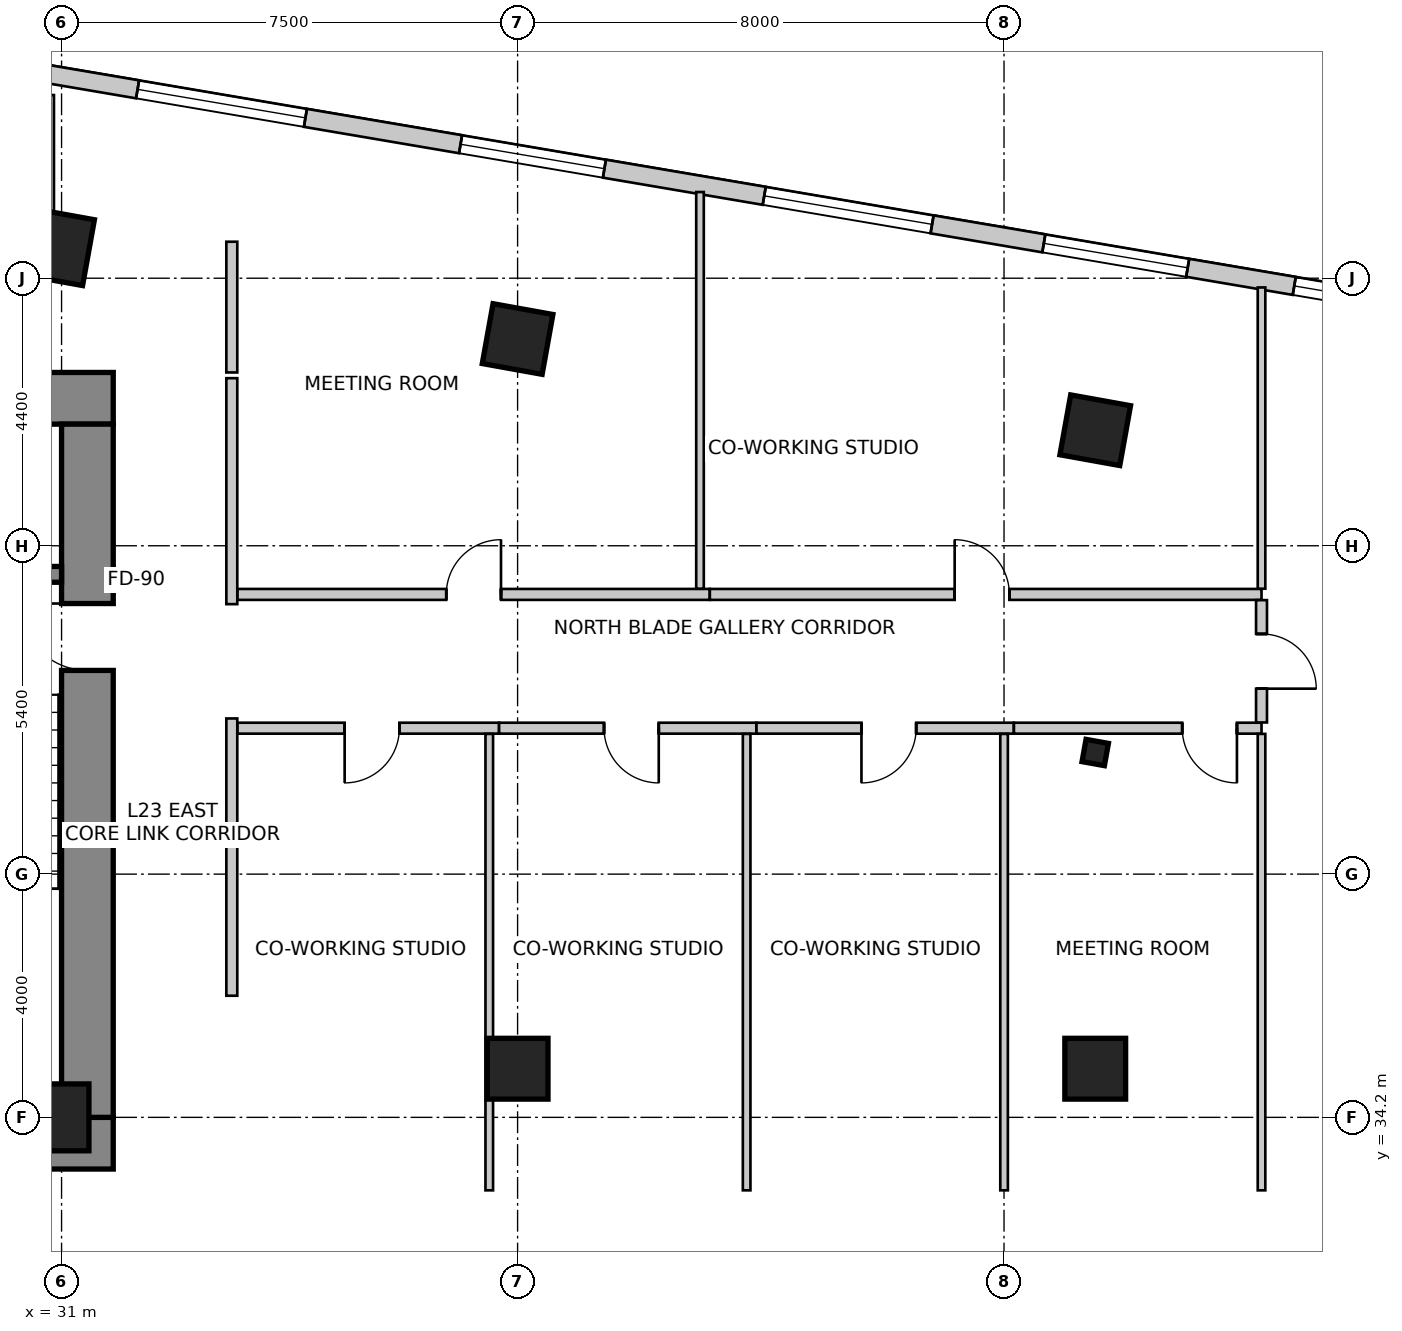
"""IFC4 building model, lengths in metres.
Left out: names, types, materials, properties, quantities, classifications, styles, units other than length and angle.
Written with IfcOpenShell. Run it as: python <this file> out.ifc"""

import sys

from ifc_helpers import new_model, si_unit, direction, frame, frame_2d, origin, origin_2d, place, context, subcontext, project, spatial, rectangle, i_section, extrude, source, transform, mapped, element, fill, save


model = new_model("IFC4")
c1 = context("Model", 3, precision=1e-05, world=origin(), true_north=direction((0.0, 1.0)))
c2 = subcontext(c1, "Body", "Model", "MODEL_VIEW")
j1 = project(units=[si_unit("LENGTHUNIT", "METRE"), si_unit("PLANEANGLEUNIT", "RADIAN")], contexts=[c1])
p1 = place(None, origin())
s1 = spatial("IfcSite", under=j1, at=p1, CompositionType="ELEMENT")
p2 = place(p1, origin())
s2 = spatial("IfcBuilding", under=s1, at=p2, CompositionType="ELEMENT")
p3 = place(p2, frame((0.0, 0.0, 95.0)))
s3 = spatial("IfcBuildingStorey", under=s2, at=p3, CompositionType="ELEMENT", Elevation=95.0)
p4 = place(p3, frame((15.75, 46.025, 0.0), z_axis=(0.0, 0.0, 1.0), x_axis=(1.0, 0.0, 0.0)))
e1 = element("IfcWall", 1, at=p4, inside=s3, PredefinedType="SHEAR", context=c2, shape_type="SweptSolid", body=[
    extrude(rectangle(XDim=16.1, YDim=0.85, at=frame_2d((8.05, 0.0))), origin(), (0.0, 0.0, 1.0), 4.0),
])
p5 = place(p3, frame((15.75, 33.775, 0.0), z_axis=(0.0, 0.0, 1.0), x_axis=(1.0, 0.0, 0.0)))
e2 = element("IfcWall", 2, at=p5, inside=s3, PredefinedType="SHEAR", context=c2, shape_type="SweptSolid", body=[
    extrude(rectangle(XDim=16.1, YDim=0.85, at=frame_2d((8.05, 0.0))), origin(), (0.0, 0.0, 1.0), 4.0),
])
m1 = source(origin(), c2, "Body", "SweptSolid", [
    extrude(rectangle(XDim=1.3, YDim=2.15, at=frame_2d((0.65, 1.075))), frame((0.0, 0.435, 0.0), z_axis=(0.0, -1.0, 0.0), x_axis=(1.0, 0.0, 0.0)), (0.0, 0.0, 1.0), 0.87),
])
p6 = place(p5, frame((10.18, 0.0, 0.0)))
e3 = element("IfcOpeningElement", 3, at=p6, cuts=e2, PredefinedType="OPENING", context=c2, shape_type="MappedRepresentation", body=[
    mapped(m1, transform((0.0, 0.0, 0.0), scale=1.0)),
])
p7 = place(p3, frame((31.425, 34.2, 0.0), z_axis=(0.0, 0.0, 1.0), x_axis=(0.0, 1.0, 0.0)))
e4 = element("IfcWall", 4, at=p7, inside=s3, PredefinedType="SHEAR", context=c2, shape_type="SweptSolid", body=[
    extrude(rectangle(XDim=11.4, YDim=0.85, at=frame_2d((5.7, 0.0))), origin(), (0.0, 0.0, 1.0), 4.0),
])
m2 = source(origin(), c2, "Body", "SweptSolid", [
    extrude(rectangle(XDim=1.1, YDim=2.15, at=frame_2d((0.55, 1.075))), frame((0.0, 0.435, 0.0), z_axis=(0.0, -1.0, 0.0), x_axis=(1.0, 0.0, 0.0)), (0.0, 0.0, 1.0), 0.87),
])
p8 = place(p7, frame((7.35, 0.0, 0.0)))
e5 = element("IfcOpeningElement", 5, at=p8, cuts=e4, PredefinedType="OPENING", context=c2, shape_type="MappedRepresentation", body=[
    mapped(m2, transform((0.0, 0.0, 0.0), scale=1.0)),
])
p9 = place(p3, frame((27.5, 43.13, 0.0), z_axis=(0.0, 0.0, 1.0), x_axis=(1.0, 0.0, 0.0)))
e6 = element("IfcWall", 6, at=p9, inside=s3, PredefinedType="SHEAR", context=c2, shape_type="SweptSolid", body=[
    extrude(rectangle(XDim=3.5, YDim=0.26, at=frame_2d((1.75, 0.0))), origin(), (0.0, 0.0, 1.0), 4.0),
])
m3 = source(origin(), c2, "Body", "SweptSolid", [
    extrude(rectangle(XDim=0.9, YDim=1.1, at=origin_2d()), origin(), (0.0, 0.0, 1.0), 4.0),
])
p10 = place(p3, frame((31.0, 48.5, 0.0), z_axis=(0.0, 0.0, 1.0), x_axis=(0.984195607969, -0.17708474032, 0.0)))
e7 = element("IfcColumn", 7, at=p10, inside=s3, PredefinedType="COLUMN", context=c2, shape_type="MappedRepresentation", body=[
    mapped(m3, transform((0.0, 0.0, 0.0), scale=1.0)),
])
m4 = source(origin(), c2, "Body", "SweptSolid", [
    extrude(rectangle(XDim=1.0, YDim=1.0, at=origin_2d()), origin(), (0.0, 0.0, 1.0), 4.0),
])
for number, where, z_axis, x_axis in (
    (8, (38.5, 47.0, 0.0), (0.0, 0.0, 1.0), (0.984, -0.177, 0.0)),
    (9, (48.0, 45.5, 0.0), (0.0, 0.0, 1.0), (0.984, -0.177, 0.0)),
):
    element("IfcColumn", number, at=place(p3, frame(where, z_axis=z_axis, x_axis=x_axis)), inside=s3, PredefinedType="COLUMN", context=c2, shape_type="MappedRepresentation", body=[
        mapped(m4, transform((0.0, 0.0, 0.0), scale=1.0)),
    ])
p11 = place(p3, frame((31.0, 34.2, 0.0), z_axis=(0.0, 0.0, 1.0), x_axis=(1.0, 0.0, 0.0)))
e10 = element("IfcColumn", 10, at=p11, inside=s3, PredefinedType="COLUMN", context=c2, shape_type="MappedRepresentation", body=[
    mapped(m3, transform((0.0, 0.0, 0.0), scale=1.0)),
])
for number, where, z_axis, x_axis in (
    (11, (38.5, 35.0, 0.0), (0.0, 0.0, 1.0), (1.0, 0.0, 0.0)),
    (12, (48.0, 35.0, 0.0), (0.0, 0.0, 1.0), (1.0, 0.0, 0.0)),
):
    element("IfcColumn", number, at=place(p3, frame(where, z_axis=z_axis, x_axis=x_axis)), inside=s3, PredefinedType="COLUMN", context=c2, shape_type="MappedRepresentation", body=[
        mapped(m4, transform((0.0, 0.0, 0.0), scale=1.0)),
    ])
m5 = source(origin(), c2, "Body", "SweptSolid", [
    extrude(i_section(OverallWidth=0.374, OverallDepth=0.372, WebThickness=0.016, FlangeThickness=0.026, FilletRadius=0.015, at=origin_2d()), origin(), (0.0, 0.0, 1.0), 4.0),
])
p12 = place(p3, frame((48.0, 40.2, 0.0), z_axis=(0.0, 0.0, 1.0), x_axis=(0.984195607969, -0.17708474032, 0.0)))
e13 = element("IfcColumn", 13, at=p12, inside=s3, PredefinedType="COLUMN", context=c2, shape_type="MappedRepresentation", body=[
    mapped(m5, transform((0.0, 0.0, 0.0), scale=1.0)),
])
p13 = place(p3, frame((53.961, 47.417, 0.0), z_axis=(0.0, 0.0, 1.0), x_axis=(-0.985865713455, 0.167537443678, 0.0)))
e14 = element("IfcWall", 14, at=p13, inside=s3, PredefinedType="SOLIDWALL", context=c2, shape_type="SweptSolid", body=[
    extrude(rectangle(XDim=32.537, YDim=0.3, at=frame_2d((16.269, 0.0))), origin(), (0.0, 0.0, 1.0), 3.7),
])
m6 = source(origin(), c2, "Body", "SweptSolid", [
    extrude(rectangle(XDim=2.1, YDim=2.0, at=frame_2d((1.05, 1.0))), frame((0.0, 0.16, 0.0), z_axis=(0.0, -1.0, 0.0), x_axis=(1.0, 0.0, 0.0)), (0.0, 0.0, 1.0), 0.32),
])
p14 = place(p13, frame((0.626, 0.0, 0.85)))
e15 = element("IfcOpeningElement", 15, at=p14, cuts=e14, PredefinedType="OPENING", context=c2, shape_type="MappedRepresentation", body=[
    mapped(m6, transform((0.0, 0.0, 0.0), scale=1.0)),
])
m7 = source(origin(), c2, "Body", "SweptSolid", [
    extrude(rectangle(XDim=2.4, YDim=2.2, at=frame_2d((1.2, 1.1))), frame((0.0, 0.16, 0.0), z_axis=(0.0, -1.0, 0.0), x_axis=(1.0, 0.0, 0.0)), (0.0, 0.0, 1.0), 0.32),
])
p15 = place(p13, frame((4.504, 0.0, 0.85)))
e16 = element("IfcOpeningElement", 16, at=p15, cuts=e14, PredefinedType="OPENING", context=c2, shape_type="MappedRepresentation", body=[
    mapped(m7, transform((0.0, 0.0, 0.0), scale=1.0)),
])
m8 = source(origin(), c2, "Body", "SweptSolid", [
    extrude(rectangle(XDim=2.8, YDim=2.4, at=frame_2d((1.4, 1.2))), frame((0.0, 0.16, 0.0), z_axis=(0.0, -1.0, 0.0), x_axis=(1.0, 0.0, 0.0)), (0.0, 0.0, 1.0), 0.32),
])
p16 = place(p13, frame((8.768, 0.0, 0.85)))
e17 = element("IfcOpeningElement", 17, at=p16, cuts=e14, PredefinedType="OPENING", context=c2, shape_type="MappedRepresentation", body=[
    mapped(m8, transform((0.0, 0.0, 0.0), scale=1.0)),
])
p17 = place(p13, frame((14.234, 0.0, 0.85)))
e18 = element("IfcOpeningElement", 18, at=p17, cuts=e14, PredefinedType="OPENING", context=c2, shape_type="MappedRepresentation", body=[
    mapped(m7, transform((0.0, 0.0, 0.0), scale=1.0)),
])
p18 = place(p13, frame((19.222, 0.0, 0.85)))
e19 = element("IfcOpeningElement", 19, at=p18, cuts=e14, PredefinedType="OPENING", context=c2, shape_type="MappedRepresentation", body=[
    mapped(m8, transform((0.0, 0.0, 0.0), scale=1.0)),
])
p19 = place(p13, frame((25.095, 0.0, 0.85)))
e20 = element("IfcOpeningElement", 20, at=p19, cuts=e14, PredefinedType="OPENING", context=c2, shape_type="MappedRepresentation", body=[
    mapped(m7, transform((0.0, 0.0, 0.0), scale=1.0)),
])
p20 = place(p13, frame((29.595, 0.0, 0.85)))
e21 = element("IfcOpeningElement", 21, at=p20, cuts=e14, PredefinedType="OPENING", context=c2, shape_type="MappedRepresentation", body=[
    mapped(m7, transform((0.0, 0.0, 0.0), scale=1.0)),
])
p21 = place(p3, frame((25.362, 48.6, 0.0), z_axis=(0.0, 0.0, 1.0), x_axis=(1.0, 0.0, 0.0)))
e22 = element("IfcWall", 22, at=p21, inside=s3, PredefinedType="PARTITIONING", context=c2, shape_type="SweptSolid", body=[
    extrude(rectangle(XDim=5.598, YDim=0.18, at=frame_2d((2.799, 0.0))), origin(), (0.0, 0.0, 1.0), 2.842),
])
m9 = source(origin(), c2, "Body", "SweptSolid", [
    extrude(rectangle(XDim=0.9, YDim=2.15, at=frame_2d((0.45, 1.075))), frame((0.0, 0.1, 0.0), z_axis=(0.0, -1.0, 0.0), x_axis=(1.0, 0.0, 0.0)), (0.0, 0.0, 1.0), 0.2),
])
p22 = place(p21, frame((2.349, 0.0, 0.0)))
e23 = element("IfcOpeningElement", 23, at=p22, cuts=e22, PredefinedType="OPENING", context=c2, shape_type="MappedRepresentation", body=[
    mapped(m9, transform((0.0, 0.0, 0.0), scale=1.0)),
])
p23 = place(p3, frame((33.8, 48.6, 0.0), z_axis=(0.0, 0.0, 1.0), x_axis=(0.0, -1.0, 0.0)))
e24 = element("IfcWall", 24, at=p23, inside=s3, PredefinedType="PARTITIONING", context=c2, shape_type="SweptSolid", body=[
    extrude(rectangle(XDim=2.15, YDim=0.18, at=frame_2d((1.075, 0.0))), origin(), (0.0, 0.0, 1.0), 2.842),
])
p24 = place(p3, frame((33.8, 40.76, 0.0), z_axis=(0.0, 0.0, 1.0), x_axis=(0.0, -1.0, 0.0)))
e25 = element("IfcWall", 25, at=p24, inside=s3, PredefinedType="PARTITIONING", context=c2, shape_type="SweptSolid", body=[
    extrude(rectangle(XDim=4.56, YDim=0.18, at=frame_2d((2.28, 0.0))), origin(), (0.0, 0.0, 1.0), 3.7),
])
p25 = place(p3, frame((33.8, 46.356, 0.0), z_axis=(0.0, 0.0, 1.0), x_axis=(0.0, -1.0, 0.0)))
e26 = element("IfcWall", 26, at=p25, inside=s3, PredefinedType="PARTITIONING", context=c2, shape_type="SweptSolid", body=[
    extrude(rectangle(XDim=3.716, YDim=0.18, at=frame_2d((1.858, 0.0))), origin(), (0.0, 0.0, 1.0), 3.272),
])
p26 = place(p3, frame((38.194, 40.6, 0.0), z_axis=(0.0, 0.0, 1.0), x_axis=(-1.0, 0.0, 0.0)))
e27 = element("IfcWall", 27, at=p26, inside=s3, PredefinedType="PARTITIONING", context=c2, shape_type="SweptSolid", body=[
    extrude(rectangle(XDim=4.3, YDim=0.18, at=frame_2d((2.15, 0.0))), origin(), (0.0, 0.0, 1.0), 3.384),
])
p27 = place(p26, frame((1.638, 0.0, 0.0)))
e28 = element("IfcOpeningElement", 28, at=p27, cuts=e27, PredefinedType="OPENING", context=c2, shape_type="MappedRepresentation", body=[
    mapped(m9, transform((0.0, 0.0, 0.0), scale=1.0)),
])
p28 = place(p3, frame((42.427, 40.6, 0.0), z_axis=(0.0, 0.0, 1.0), x_axis=(-1.0, 0.0, 0.0)))
e29 = element("IfcWall", 29, at=p28, inside=s3, PredefinedType="PARTITIONING", context=c2, shape_type="SweptSolid", body=[
    extrude(rectangle(XDim=4.231, YDim=0.18, at=frame_2d((2.115, 0.0))), origin(), (0.0, 0.0, 1.0), 3.075),
])
p29 = place(p28, frame((1.605, 0.0, 0.0)))
e30 = element("IfcOpeningElement", 30, at=p29, cuts=e29, PredefinedType="OPENING", context=c2, shape_type="MappedRepresentation", body=[
    mapped(m9, transform((0.0, 0.0, 0.0), scale=1.0)),
])
p30 = place(p3, frame((46.661, 40.6, 0.0), z_axis=(0.0, 0.0, 1.0), x_axis=(-1.0, 0.0, 0.0)))
e31 = element("IfcWall", 31, at=p30, inside=s3, PredefinedType="PARTITIONING", context=c2, shape_type="SweptSolid", body=[
    extrude(rectangle(XDim=4.232, YDim=0.18, at=frame_2d((2.116, 0.0))), origin(), (0.0, 0.0, 1.0), 3.272),
])
p31 = place(p30, frame((1.606, 0.0, 0.0)))
e32 = element("IfcOpeningElement", 32, at=p31, cuts=e31, PredefinedType="OPENING", context=c2, shape_type="MappedRepresentation", body=[
    mapped(m9, transform((0.0, 0.0, 0.0), scale=1.0)),
])
p32 = place(p3, frame((50.735, 40.6, 0.0), z_axis=(0.0, 0.0, 1.0), x_axis=(-1.0, 0.0, 0.0)))
e33 = element("IfcWall", 33, at=p32, inside=s3, PredefinedType="PARTITIONING", context=c2, shape_type="SweptSolid", body=[
    extrude(rectangle(XDim=4.072, YDim=0.18, at=frame_2d((2.036, 0.0))), origin(), (0.0, 0.0, 1.0), 3.075),
])
p33 = place(p32, frame((0.404, 0.0, 0.0)))
e34 = element("IfcOpeningElement", 34, at=p33, cuts=e33, PredefinedType="OPENING", context=c2, shape_type="MappedRepresentation", body=[
    mapped(m9, transform((0.0, 0.0, 0.0), scale=1.0)),
])
p34 = place(p3, frame((33.894, 42.8, 0.0), z_axis=(0.0, 0.0, 1.0), x_axis=(1.0, 0.0, 0.0)))
e35 = element("IfcWall", 35, at=p34, inside=s3, PredefinedType="PARTITIONING", context=c2, shape_type="SweptSolid", body=[
    extrude(rectangle(XDim=7.766, YDim=0.18, at=frame_2d((3.883, 0.0))), origin(), (0.0, 0.0, 1.0), 3.075),
])
p35 = place(p34, frame((3.433, 0.0, 0.0)))
e36 = element("IfcOpeningElement", 36, at=p35, cuts=e35, PredefinedType="OPENING", context=c2, shape_type="MappedRepresentation", body=[
    mapped(m9, transform((0.0, 0.0, 0.0), scale=1.0)),
])
p36 = place(p3, frame((41.662, 42.8, 0.0), z_axis=(0.0, 0.0, 1.0), x_axis=(1.0, 0.0, 0.0)))
e37 = element("IfcWall", 37, at=p36, inside=s3, PredefinedType="PARTITIONING", context=c2, shape_type="SweptSolid", body=[
    extrude(rectangle(XDim=9.073, YDim=0.18, at=frame_2d((4.537, 0.0))), origin(), (0.0, 0.0, 1.0), 3.075),
])
p37 = place(p36, frame((4.026, 0.0, 0.0)))
e38 = element("IfcOpeningElement", 38, at=p37, cuts=e37, PredefinedType="OPENING", context=c2, shape_type="MappedRepresentation", body=[
    mapped(m9, transform((0.0, 0.0, 0.0), scale=1.0)),
])
p38 = place(p3, frame((50.735, 42.706, 0.0), z_axis=(0.0, 0.0, 1.0), x_axis=(0.0, -1.0, 0.0)))
e39 = element("IfcWall", 39, at=p38, inside=s3, PredefinedType="PARTITIONING", context=c2, shape_type="SweptSolid", body=[
    extrude(rectangle(XDim=2.012, YDim=0.18, at=frame_2d((1.006, 0.0))), origin(), (0.0, 0.0, 1.0), 3.7),
])
p39 = place(p38, frame((0.556, 0.0, 0.0)))
e40 = element("IfcOpeningElement", 40, at=p39, cuts=e39, PredefinedType="OPENING", context=c2, shape_type="MappedRepresentation", body=[
    mapped(m9, transform((0.0, 0.0, 0.0), scale=1.0)),
])
p40 = place(p3, frame((38.034, 40.506, 0.0), z_axis=(0.0, 0.0, 1.0), x_axis=(0.0, -1.0, 0.0)))
e41 = element("IfcWall", 41, at=p40, inside=s3, PredefinedType="PARTITIONING", context=c2, shape_type="SweptSolid", body=[
    extrude(rectangle(XDim=7.506, YDim=0.125, at=frame_2d((3.753, 0.0))), origin(), (0.0, 0.0, 1.0), 3.384),
])
for number, where, z_axis, x_axis in (
    (42, (42.267, 40.506, 0.0), (0.0, 0.0, 1.0), (0.0, -1.0, 0.0)),
    (43, (46.501, 40.506, 0.0), (0.0, 0.0, 1.0), (0.0, -1.0, 0.0)),
):
    element("IfcWall", number, at=place(p3, frame(where, z_axis=z_axis, x_axis=x_axis)), inside=s3, PredefinedType="PARTITIONING", context=c2, shape_type="SweptSolid", body=[
        extrude(rectangle(XDim=7.506, YDim=0.125, at=frame_2d((3.753, 0.0))), origin(), (0.0, 0.0, 1.0), 2.842),
    ])
p41 = place(p3, frame((50.735, 40.506, 0.0), z_axis=(0.0, 0.0, 1.0), x_axis=(0.0, -1.0, 0.0)))
e44 = element("IfcWall", 44, at=p41, inside=s3, PredefinedType="PARTITIONING", context=c2, shape_type="SweptSolid", body=[
    extrude(rectangle(XDim=7.506, YDim=0.125, at=frame_2d((3.753, 0.0))), origin(), (0.0, 0.0, 1.0), 3.7),
])
p42 = place(p3, frame((41.5, 49.417, 0.0), z_axis=(0.0, 0.0, 1.0), x_axis=(0.0, -1.0, 0.0)))
e45 = element("IfcWall", 45, at=p42, inside=s3, PredefinedType="PARTITIONING", context=c2, shape_type="SweptSolid", body=[
    extrude(rectangle(XDim=6.523, YDim=0.125, at=frame_2d((3.262, 0.0))), origin(), (0.0, 0.0, 1.0), 2.842),
])
p43 = place(p3, frame((50.735, 47.848, 0.0), z_axis=(0.0, 0.0, 1.0), x_axis=(0.0, -1.0, 0.0)))
e46 = element("IfcWall", 46, at=p43, inside=s3, PredefinedType="PARTITIONING", context=c2, shape_type="SweptSolid", body=[
    extrude(rectangle(XDim=4.954, YDim=0.125, at=frame_2d((2.477, 0.0))), origin(), (0.0, 0.0, 1.0), 3.7),
])
p44 = place(p3, frame((30.8, 51.013, 0.0), z_axis=(0.0, 0.0, 1.0), x_axis=(0.0, -1.0, 0.0)))
e47 = element("IfcWall", 47, at=p44, inside=s3, PredefinedType="PARTITIONING", context=c2, shape_type="SweptSolid", body=[
    extrude(rectangle(XDim=2.193, YDim=0.15, at=frame_2d((1.096, 0.0))), origin(), (0.0, 0.0, 1.0), 3.7),
])
m10 = source(origin(), c2, "Body", "SweptSolid", [
    extrude(rectangle(XDim=2.1, YDim=2.0, at=frame_2d((1.05, 1.0))), frame((0.0, -0.015, 0.0), z_axis=(0.0, -1.0, 0.0), x_axis=(1.0, 0.0, 0.0)), (0.0, 0.0, 1.0), 0.06),
])
p45 = place(p14, origin())
e48 = element("IfcWindow", 48, at=p45, inside=s3, PartitioningType="SINGLE_PANEL", PredefinedType="WINDOW", context=c2, shape_type="MappedRepresentation", body=[
    mapped(m10, transform((0.0, 0.0, 0.0), scale=1.0)),
])
fill(e15, e48)
m11 = source(origin(), c2, "Body", "SweptSolid", [
    extrude(rectangle(XDim=2.4, YDim=2.2, at=frame_2d((1.2, 1.1))), frame((0.0, -0.015, 0.0), z_axis=(0.0, -1.0, 0.0), x_axis=(1.0, 0.0, 0.0)), (0.0, 0.0, 1.0), 0.06),
])
p46 = place(p15, origin())
e49 = element("IfcWindow", 49, at=p46, inside=s3, PartitioningType="SINGLE_PANEL", PredefinedType="WINDOW", context=c2, shape_type="MappedRepresentation", body=[
    mapped(m11, transform((0.0, 0.0, 0.0), scale=1.0)),
])
fill(e16, e49)
m12 = source(origin(), c2, "Body", "SweptSolid", [
    extrude(rectangle(XDim=2.8, YDim=2.4, at=frame_2d((1.4, 1.2))), frame((0.0, -0.015, 0.0), z_axis=(0.0, -1.0, 0.0), x_axis=(1.0, 0.0, 0.0)), (0.0, 0.0, 1.0), 0.06),
])
p47 = place(p16, origin())
e50 = element("IfcWindow", 50, at=p47, inside=s3, PartitioningType="SINGLE_PANEL", PredefinedType="WINDOW", context=c2, shape_type="MappedRepresentation", body=[
    mapped(m12, transform((0.0, 0.0, 0.0), scale=1.0)),
])
fill(e17, e50)
p48 = place(p17, origin())
e51 = element("IfcWindow", 51, at=p48, inside=s3, PartitioningType="SINGLE_PANEL", PredefinedType="WINDOW", context=c2, shape_type="MappedRepresentation", body=[
    mapped(m11, transform((0.0, 0.0, 0.0), scale=1.0)),
])
fill(e18, e51)
p49 = place(p18, origin())
e52 = element("IfcWindow", 52, at=p49, inside=s3, PartitioningType="SINGLE_PANEL", PredefinedType="WINDOW", context=c2, shape_type="MappedRepresentation", body=[
    mapped(m12, transform((0.0, 0.0, 0.0), scale=1.0)),
])
fill(e19, e52)
m13 = source(origin(), c2, "Body", "SweptSolid", [
    extrude(rectangle(XDim=1.1, YDim=2.15, at=frame_2d((0.55, 1.075))), frame((0.0, 0.025, 0.0), z_axis=(0.0, -1.0, 0.0), x_axis=(1.0, 0.0, 0.0)), (0.0, 0.0, 1.0), 0.05),
])
p50 = place(p8, origin())
e53 = element("IfcDoor", 53, at=p50, inside=s3, OperationType="SINGLE_SWING_RIGHT", PredefinedType="DOOR", context=c2, shape_type="MappedRepresentation", body=[
    mapped(m13, transform((0.0, 0.0, 0.0), scale=1.0)),
])
fill(e5, e53)
m14 = source(origin(), c2, "Body", "SweptSolid", [
    extrude(rectangle(XDim=0.9, YDim=2.15, at=frame_2d((0.45, 1.075))), frame((0.0, 0.025, 0.0), z_axis=(0.0, -1.0, 0.0), x_axis=(1.0, 0.0, 0.0)), (0.0, 0.0, 1.0), 0.05),
])
p51 = place(p27, origin())
e54 = element("IfcDoor", 54, at=p51, inside=s3, OperationType="SINGLE_SWING_RIGHT", PredefinedType="DOOR", context=c2, shape_type="MappedRepresentation", body=[
    mapped(m14, transform((0.0, 0.0, 0.0), scale=1.0)),
])
fill(e28, e54)
p52 = place(p29, origin())
e55 = element("IfcDoor", 55, at=p52, inside=s3, OperationType="SINGLE_SWING_LEFT", PredefinedType="DOOR", context=c2, shape_type="MappedRepresentation", body=[
    mapped(m14, transform((0.0, 0.0, 0.0), scale=1.0)),
])
fill(e30, e55)
p53 = place(p31, origin())
e56 = element("IfcDoor", 56, at=p53, inside=s3, OperationType="SINGLE_SWING_RIGHT", PredefinedType="DOOR", context=c2, shape_type="MappedRepresentation", body=[
    mapped(m14, transform((0.0, 0.0, 0.0), scale=1.0)),
])
fill(e32, e56)
p54 = place(p33, origin())
e57 = element("IfcDoor", 57, at=p54, inside=s3, OperationType="SINGLE_SWING_LEFT", PredefinedType="DOOR", context=c2, shape_type="MappedRepresentation", body=[
    mapped(m14, transform((0.0, 0.0, 0.0), scale=1.0)),
])
fill(e34, e57)
p55 = place(p35, origin())
e58 = element("IfcDoor", 58, at=p55, inside=s3, OperationType="SINGLE_SWING_RIGHT", PredefinedType="DOOR", context=c2, shape_type="MappedRepresentation", body=[
    mapped(m14, transform((0.0, 0.0, 0.0), scale=1.0)),
])
fill(e36, e58)
p56 = place(p37, origin())
e59 = element("IfcDoor", 59, at=p56, inside=s3, OperationType="SINGLE_SWING_LEFT", PredefinedType="DOOR", context=c2, shape_type="MappedRepresentation", body=[
    mapped(m14, transform((0.0, 0.0, 0.0), scale=1.0)),
])
fill(e38, e59)
p57 = place(p39, origin())
e60 = element("IfcDoor", 60, at=p57, inside=s3, OperationType="SINGLE_SWING_RIGHT", PredefinedType="DOOR", context=c2, shape_type="MappedRepresentation", body=[
    mapped(m14, transform((0.0, 0.0, 0.0), scale=1.0)),
])
fill(e40, e60)
save(model, sys.argv[1])
